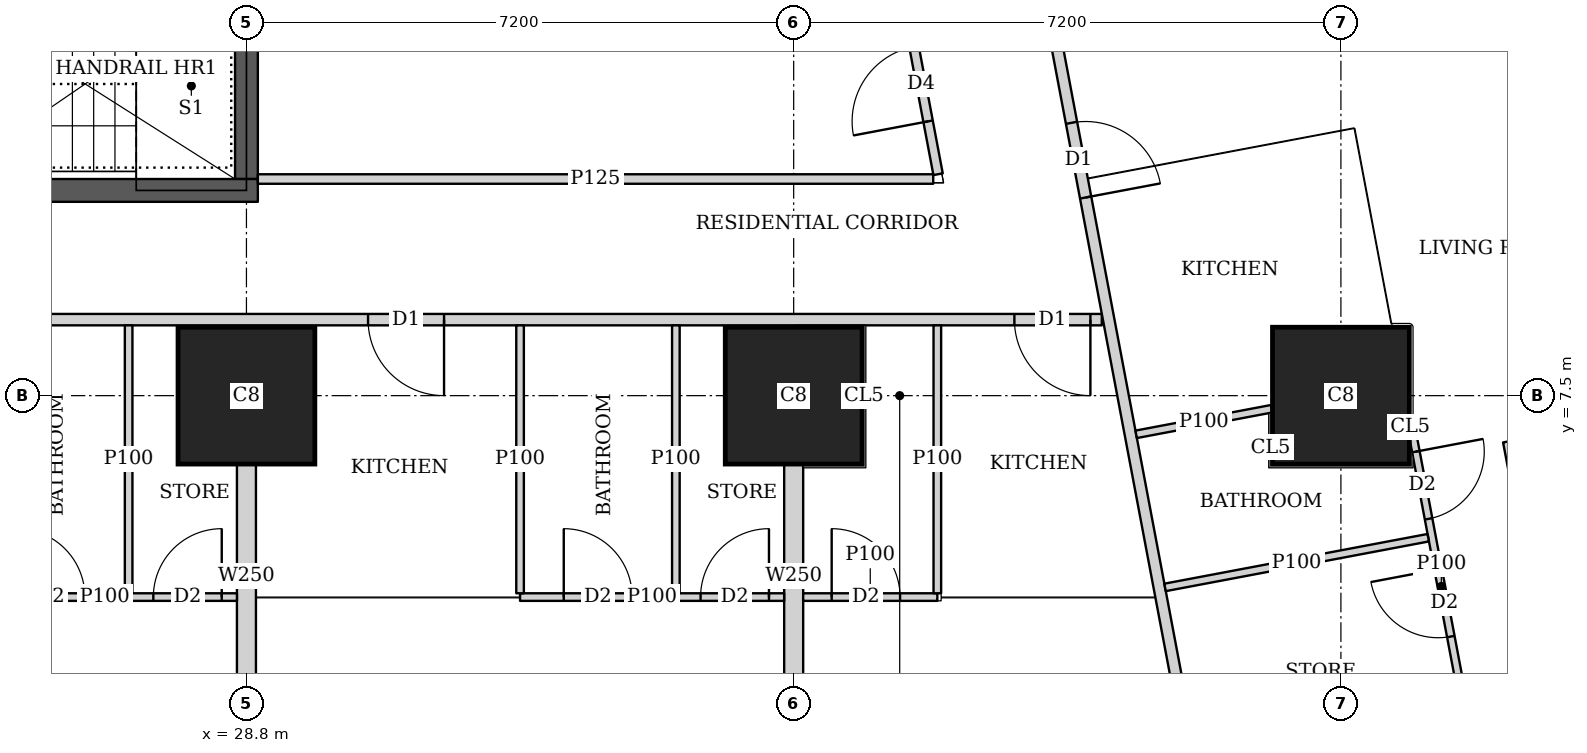
"""IFC4 building model, lengths in metres.
Left out: names, types, materials, properties, quantities, classifications, styles, units other than length and angle.
Written with IfcOpenShell. Run it as: python <this file> out.ifc"""

import sys

from ifc_helpers import new_model, si_unit, direction, frame, frame_2d, origin, origin_2d, place, context, subcontext, project, spatial, rectangle, extrude, element, fill, save


model = new_model("IFC4")
c1 = context("Model", 3, precision=1e-05, world=origin(), true_north=direction((0.0, 1.0)))
c2 = subcontext(c1, "Body", "Model", "MODEL_VIEW")
j1 = project(units=[si_unit("LENGTHUNIT", "METRE"), si_unit("PLANEANGLEUNIT", "RADIAN")], contexts=[c1])
p1 = place(None, origin())
s1 = spatial("IfcSite", under=j1, at=p1, CompositionType="ELEMENT")
p2 = place(p1, origin())
s2 = spatial("IfcBuilding", under=s1, at=p2, CompositionType="ELEMENT")
p3 = place(p2, frame((0.0, 0.0, 42.5)))
s3 = spatial("IfcBuildingStorey", under=s2, at=p3, CompositionType="ELEMENT", Elevation=42.5)
for number, where, z_axis, x_axis in (
    (1, (28.8, 7.5, 0.0), (0.0, 0.0, 1.0), (1.0, 0.0, 0.0)),
    (2, (36.0, 7.5, 0.0), (0.0, 0.0, 1.0), (1.0, 0.0, 0.0)),
    (3, (43.2, 7.5, 0.0), (0.0, 0.0, 1.0), (1.0, 0.0, 0.0)),
):
    element("IfcColumn", number, at=place(p3, frame(where, z_axis=z_axis, x_axis=x_axis)), inside=s3, PredefinedType="COLUMN", context=c2, shape_type="SweptSolid", body=[
        extrude(rectangle(XDim=1.8, YDim=1.8, at=origin_2d()), origin(), (0.0, 0.0, 1.0), 3.75),
    ])
p4 = place(p3, frame((21.45, 10.2, 0.0), z_axis=(0.0, 0.0, 1.0), x_axis=(1.0, 0.0, 0.0)))
e4 = element("IfcWall", 4, at=p4, inside=s3, PredefinedType="SHEAR", context=c2, shape_type="SweptSolid", body=[
    extrude(rectangle(XDim=7.5, YDim=0.3, at=frame_2d((3.75, 0.0))), origin(), (0.0, 0.0, 1.0), 3.75),
])
p5 = place(p4, frame((0.5, 0.0, 0.0)))
e5 = element("IfcOpeningElement", 5, at=p5, cuts=e4, PredefinedType="OPENING", context=c2, shape_type="SweptSolid", body=[
    extrude(rectangle(XDim=1.1, YDim=2.1, at=frame_2d((0.55, 1.05))), frame((0.0, 0.16, 0.0), z_axis=(0.0, -1.0, 0.0), x_axis=(1.0, 0.0, 0.0)), (0.0, 0.0, 1.0), 0.32),
])
p6 = place(p3, frame((28.8, 10.35, 0.0), z_axis=(0.0, 0.0, 1.0), x_axis=(0.0, 1.0, 0.0)))
e6 = element("IfcWall", 6, at=p6, inside=s3, PredefinedType="SHEAR", context=c2, shape_type="SweptSolid", body=[
    extrude(rectangle(XDim=4.2, YDim=0.3, at=frame_2d((2.1, 0.0))), origin(), (0.0, 0.0, 1.0), 3.75),
])
p7 = place(p3, frame((50.653, 2.703, 0.0), z_axis=(0.0, 0.0, 1.0), x_axis=(-0.185612026696, 0.982623109613, 0.0)))
e7 = element("IfcWall", 7, at=p7, inside=s3, PredefinedType="SOLIDWALL", context=c2, shape_type="SweptSolid", body=[
    extrude(rectangle(XDim=41.393, YDim=0.2, at=frame_2d((20.697, 0.0))), origin(), (0.0, 0.0, 1.0), 3.5),
])
p8 = place(p7, frame((1.633, 0.0, 0.9)))
e8 = element("IfcOpeningElement", 8, at=p8, cuts=e7, PredefinedType="OPENING", context=c2, shape_type="SweptSolid", body=[
    extrude(rectangle(XDim=1.8, YDim=1.5, at=frame_2d((0.9, 0.75))), frame((0.0, 0.11, 0.0), z_axis=(0.0, -1.0, 0.0), x_axis=(1.0, 0.0, 0.0)), (0.0, 0.0, 1.0), 0.22),
])
p9 = place(p7, frame((6.032, 0.0, 0.9)))
e9 = element("IfcOpeningElement", 9, at=p9, cuts=e7, PredefinedType="OPENING", context=c2, shape_type="SweptSolid", body=[
    extrude(rectangle(XDim=1.8, YDim=1.5, at=frame_2d((0.9, 0.75))), frame((0.0, 0.11, 0.0), z_axis=(0.0, -1.0, 0.0), x_axis=(1.0, 0.0, 0.0)), (0.0, 0.0, 1.0), 0.22),
])
p10 = place(p7, frame((9.848, 0.0, 0.9)))
e10 = element("IfcOpeningElement", 10, at=p10, cuts=e7, PredefinedType="OPENING", context=c2, shape_type="SweptSolid", body=[
    extrude(rectangle(XDim=1.8, YDim=1.5, at=frame_2d((0.9, 0.75))), frame((0.0, 0.11, 0.0), z_axis=(0.0, -1.0, 0.0), x_axis=(1.0, 0.0, 0.0)), (0.0, 0.0, 1.0), 0.22),
])
p11 = place(p7, frame((17.481, 0.0, 0.9)))
e11 = element("IfcOpeningElement", 11, at=p11, cuts=e7, PredefinedType="OPENING", context=c2, shape_type="SweptSolid", body=[
    extrude(rectangle(XDim=1.8, YDim=1.5, at=frame_2d((0.9, 0.75))), frame((0.0, 0.11, 0.0), z_axis=(0.0, -1.0, 0.0), x_axis=(1.0, 0.0, 0.0)), (0.0, 0.0, 1.0), 0.22),
])
p12 = place(p7, frame((21.297, 0.0, 0.9)))
e12 = element("IfcOpeningElement", 12, at=p12, cuts=e7, PredefinedType="OPENING", context=c2, shape_type="SweptSolid", body=[
    extrude(rectangle(XDim=1.8, YDim=1.5, at=frame_2d((0.9, 0.75))), frame((0.0, 0.11, 0.0), z_axis=(0.0, -1.0, 0.0), x_axis=(1.0, 0.0, 0.0)), (0.0, 0.0, 1.0), 0.22),
])
p13 = place(p7, frame((25.113, 0.0, 0.9)))
e13 = element("IfcOpeningElement", 13, at=p13, cuts=e7, PredefinedType="OPENING", context=c2, shape_type="SweptSolid", body=[
    extrude(rectangle(XDim=1.8, YDim=1.5, at=frame_2d((0.9, 0.75))), frame((0.0, 0.11, 0.0), z_axis=(0.0, -1.0, 0.0), x_axis=(1.0, 0.0, 0.0)), (0.0, 0.0, 1.0), 0.22),
])
p14 = place(p7, frame((28.93, 0.0, 0.9)))
e14 = element("IfcOpeningElement", 14, at=p14, cuts=e7, PredefinedType="OPENING", context=c2, shape_type="SweptSolid", body=[
    extrude(rectangle(XDim=1.8, YDim=1.5, at=frame_2d((0.9, 0.75))), frame((0.0, 0.11, 0.0), z_axis=(0.0, -1.0, 0.0), x_axis=(1.0, 0.0, 0.0)), (0.0, 0.0, 1.0), 0.22),
])
p15 = place(p7, frame((32.746, 0.0, 0.9)))
e15 = element("IfcOpeningElement", 15, at=p15, cuts=e7, PredefinedType="OPENING", context=c2, shape_type="SweptSolid", body=[
    extrude(rectangle(XDim=1.8, YDim=1.5, at=frame_2d((0.9, 0.75))), frame((0.0, 0.11, 0.0), z_axis=(0.0, -1.0, 0.0), x_axis=(1.0, 0.0, 0.0)), (0.0, 0.0, 1.0), 0.22),
])
p16 = place(p7, frame((36.481, 0.0, 0.9)))
e16 = element("IfcOpeningElement", 16, at=p16, cuts=e7, PredefinedType="OPENING", context=c2, shape_type="SweptSolid", body=[
    extrude(rectangle(XDim=1.8, YDim=1.5, at=frame_2d((0.9, 0.75))), frame((0.0, 0.11, 0.0), z_axis=(0.0, -1.0, 0.0), x_axis=(1.0, 0.0, 0.0)), (0.0, 0.0, 1.0), 0.22),
])
p17 = place(p3, frame((40.054, 8.5, 0.0), z_axis=(0.0, 0.0, 1.0), x_axis=(-1.0, 0.0, 0.0)))
e17 = element("IfcWall", 17, at=p17, inside=s3, PredefinedType="SOLIDWALL", context=c2, shape_type="SweptSolid", body=[
    extrude(rectangle(XDim=31.704, YDim=0.15, at=frame_2d((15.852, 0.0))), origin(), (0.0, 0.0, 1.0), 3.5),
])
p18 = place(p17, frame((27.321, 0.0, 0.0)))
e18 = element("IfcOpeningElement", 18, at=p18, cuts=e17, PredefinedType="OPENING", context=c2, shape_type="SweptSolid", body=[
    extrude(rectangle(XDim=1.0, YDim=2.1, at=frame_2d((0.5, 1.05))), frame((0.0, 0.085, 0.0), z_axis=(0.0, -1.0, 0.0), x_axis=(1.0, 0.0, 0.0)), (0.0, 0.0, 1.0), 0.17),
])
p19 = place(p17, frame((23.054, 0.0, 0.0)))
e19 = element("IfcOpeningElement", 19, at=p19, cuts=e17, PredefinedType="OPENING", context=c2, shape_type="SweptSolid", body=[
    extrude(rectangle(XDim=1.0, YDim=2.1, at=frame_2d((0.5, 1.05))), frame((0.0, 0.085, 0.0), z_axis=(0.0, -1.0, 0.0), x_axis=(1.0, 0.0, 0.0)), (0.0, 0.0, 1.0), 0.17),
])
p20 = place(p17, frame((15.854, 0.0, 0.0)))
e20 = element("IfcOpeningElement", 20, at=p20, cuts=e17, PredefinedType="OPENING", context=c2, shape_type="SweptSolid", body=[
    extrude(rectangle(XDim=1.0, YDim=2.1, at=frame_2d((0.5, 1.05))), frame((0.0, 0.085, 0.0), z_axis=(0.0, -1.0, 0.0), x_axis=(1.0, 0.0, 0.0)), (0.0, 0.0, 1.0), 0.17),
])
p21 = place(p17, frame((8.654, 0.0, 0.0)))
e21 = element("IfcOpeningElement", 21, at=p21, cuts=e17, PredefinedType="OPENING", context=c2, shape_type="SweptSolid", body=[
    extrude(rectangle(XDim=1.0, YDim=2.1, at=frame_2d((0.5, 1.05))), frame((0.0, 0.085, 0.0), z_axis=(0.0, -1.0, 0.0), x_axis=(1.0, 0.0, 0.0)), (0.0, 0.0, 1.0), 0.17),
])
p22 = place(p17, frame((0.15, 0.0, 0.0)))
e22 = element("IfcOpeningElement", 22, at=p22, cuts=e17, PredefinedType="OPENING", context=c2, shape_type="SweptSolid", body=[
    extrude(rectangle(XDim=1.0, YDim=2.1, at=frame_2d((0.5, 1.05))), frame((0.0, 0.085, 0.0), z_axis=(0.0, -1.0, 0.0), x_axis=(1.0, 0.0, 0.0)), (0.0, 0.0, 1.0), 0.17),
])
p23 = place(p3, frame((33.68, 42.723, 0.0), z_axis=(0.0, 0.0, 1.0), x_axis=(0.185624129307, -0.98262082342, 0.0)))
e23 = element("IfcWall", 23, at=p23, inside=s3, PredefinedType="SOLIDWALL", context=c2, shape_type="SweptSolid", body=[
    extrude(rectangle(XDim=41.051, YDim=0.15, at=frame_2d((20.526, 0.0))), origin(), (0.0, 0.0, 1.0), 2.5),
])
p24 = place(p23, frame((7.73, 0.0, 0.0)))
e24 = element("IfcOpeningElement", 24, at=p24, cuts=e23, PredefinedType="OPENING", context=c2, shape_type="SweptSolid", body=[
    extrude(rectangle(XDim=1.0, YDim=2.1, at=frame_2d((0.5, 1.05))), frame((0.0, 0.085, 0.0), z_axis=(0.0, -1.0, 0.0), x_axis=(1.0, 0.0, 0.0)), (0.0, 0.0, 1.0), 0.17),
])
p25 = place(p23, frame((12.307, 0.0, 0.0)))
e25 = element("IfcOpeningElement", 25, at=p25, cuts=e23, PredefinedType="OPENING", context=c2, shape_type="SweptSolid", body=[
    extrude(rectangle(XDim=1.0, YDim=2.1, at=frame_2d((0.5, 1.05))), frame((0.0, 0.085, 0.0), z_axis=(0.0, -1.0, 0.0), x_axis=(1.0, 0.0, 0.0)), (0.0, 0.0, 1.0), 0.17),
])
p26 = place(p23, frame((19.938, 0.0, 0.0)))
e26 = element("IfcOpeningElement", 26, at=p26, cuts=e23, PredefinedType="OPENING", context=c2, shape_type="SweptSolid", body=[
    extrude(rectangle(XDim=1.0, YDim=2.1, at=frame_2d((0.5, 1.05))), frame((0.0, 0.085, 0.0), z_axis=(0.0, -1.0, 0.0), x_axis=(1.0, 0.0, 0.0)), (0.0, 0.0, 1.0), 0.17),
])
p27 = place(p23, frame((32.193, 0.0, 0.0)))
e27 = element("IfcOpeningElement", 27, at=p27, cuts=e23, PredefinedType="OPENING", context=c2, shape_type="SweptSolid", body=[
    extrude(rectangle(XDim=1.0, YDim=2.1, at=frame_2d((0.5, 1.05))), frame((0.0, 0.085, 0.0), z_axis=(0.0, -1.0, 0.0), x_axis=(1.0, 0.0, 0.0)), (0.0, 0.0, 1.0), 0.17),
])
p28 = place(p3, frame((28.675, 4.85, 0.0), z_axis=(0.0, 0.0, 1.0), x_axis=(-1.0, 0.0, 0.0)))
e28 = element("IfcWall", 28, at=p28, inside=s3, PredefinedType="PARTITIONING", context=c2, shape_type="SweptSolid", body=[
    extrude(rectangle(XDim=3.475, YDim=0.1, at=frame_2d((1.738, 0.0))), origin(), (0.0, 0.0, 1.0), 3.5),
])
p29 = place(p28, frame((2.0, 0.0, 0.0)))
e29 = element("IfcOpeningElement", 29, at=p29, cuts=e28, PredefinedType="OPENING", context=c2, shape_type="SweptSolid", body=[
    extrude(rectangle(XDim=0.9, YDim=2.1, at=frame_2d((0.45, 1.05))), frame((0.0, 0.06, 0.0), z_axis=(0.0, -1.0, 0.0), x_axis=(1.0, 0.0, 0.0)), (0.0, 0.0, 1.0), 0.12),
])
p30 = place(p28, frame((0.2, 0.0, 0.0)))
e30 = element("IfcOpeningElement", 30, at=p30, cuts=e28, PredefinedType="OPENING", context=c2, shape_type="SweptSolid", body=[
    extrude(rectangle(XDim=0.9, YDim=2.1, at=frame_2d((0.45, 1.05))), frame((0.0, 0.06, 0.0), z_axis=(0.0, -1.0, 0.0), x_axis=(1.0, 0.0, 0.0)), (0.0, 0.0, 1.0), 0.12),
])
p31 = place(p3, frame((27.25, 4.9, 0.0), z_axis=(0.0, 0.0, 1.0), x_axis=(0.0, 1.0, 0.0)))
e31 = element("IfcWall", 31, at=p31, inside=s3, PredefinedType="PARTITIONING", context=c2, shape_type="SweptSolid", body=[
    extrude(rectangle(XDim=3.525, YDim=0.1, at=frame_2d((1.763, 0.0))), origin(), (0.0, 0.0, 1.0), 3.5),
])
p32 = place(p3, frame((35.875, 4.85, 0.0), z_axis=(0.0, 0.0, 1.0), x_axis=(-1.0, 0.0, 0.0)))
e32 = element("IfcWall", 32, at=p32, inside=s3, PredefinedType="PARTITIONING", context=c2, shape_type="SweptSolid", body=[
    extrude(rectangle(XDim=3.475, YDim=0.1, at=frame_2d((1.738, 0.0))), origin(), (0.0, 0.0, 1.0), 3.5),
])
p33 = place(p32, frame((2.0, 0.0, 0.0)))
e33 = element("IfcOpeningElement", 33, at=p33, cuts=e32, PredefinedType="OPENING", context=c2, shape_type="SweptSolid", body=[
    extrude(rectangle(XDim=0.9, YDim=2.1, at=frame_2d((0.45, 1.05))), frame((0.0, 0.06, 0.0), z_axis=(0.0, -1.0, 0.0), x_axis=(1.0, 0.0, 0.0)), (0.0, 0.0, 1.0), 0.12),
])
p34 = place(p32, frame((0.2, 0.0, 0.0)))
e34 = element("IfcOpeningElement", 34, at=p34, cuts=e32, PredefinedType="OPENING", context=c2, shape_type="SweptSolid", body=[
    extrude(rectangle(XDim=0.9, YDim=2.1, at=frame_2d((0.45, 1.05))), frame((0.0, 0.06, 0.0), z_axis=(0.0, -1.0, 0.0), x_axis=(1.0, 0.0, 0.0)), (0.0, 0.0, 1.0), 0.12),
])
for number, where, z_axis, x_axis in (
    (35, (32.4, 4.9, 0.0), (0.0, 0.0, 1.0), (0.0, 1.0, 0.0)),
    (36, (34.45, 4.9, 0.0), (0.0, 0.0, 1.0), (0.0, 1.0, 0.0)),
):
    element("IfcWall", number, at=place(p3, frame(where, z_axis=z_axis, x_axis=x_axis)), inside=s3, PredefinedType="PARTITIONING", context=c2, shape_type="SweptSolid", body=[
        extrude(rectangle(XDim=3.525, YDim=0.1, at=frame_2d((1.763, 0.0))), origin(), (0.0, 0.0, 1.0), 3.5),
    ])
p35 = place(p3, frame((28.8, 3.65, 0.0), z_axis=(0.0, 0.0, 1.0), x_axis=(0.0, 1.0, 0.0)))
e37 = element("IfcWall", 37, at=p35, inside=s3, PredefinedType="SOLIDWALL", context=c2, shape_type="SweptSolid", body=[
    extrude(rectangle(XDim=2.949, YDim=0.25, at=frame_2d((1.475, 0.0))), origin(), (0.0, 0.0, 1.0), 3.5),
])
p36 = place(p3, frame((37.89, 4.85, 0.0), z_axis=(0.0, 0.0, 1.0), x_axis=(-1.0, 0.0, 0.0)))
e38 = element("IfcWall", 38, at=p36, inside=s3, PredefinedType="PARTITIONING", context=c2, shape_type="SweptSolid", body=[
    extrude(rectangle(XDim=1.765, YDim=0.1, at=frame_2d((0.882, 0.0))), origin(), (0.0, 0.0, 1.0), 3.5),
])
p37 = place(p36, frame((0.49, 0.0, 0.0)))
e39 = element("IfcOpeningElement", 39, at=p37, cuts=e38, PredefinedType="OPENING", context=c2, shape_type="SweptSolid", body=[
    extrude(rectangle(XDim=0.9, YDim=2.1, at=frame_2d((0.45, 1.05))), frame((0.0, 0.06, 0.0), z_axis=(0.0, -1.0, 0.0), x_axis=(1.0, 0.0, 0.0)), (0.0, 0.0, 1.0), 0.12),
])
p38 = place(p3, frame((37.89, 4.9, 0.0), z_axis=(0.0, 0.0, 1.0), x_axis=(0.0, 1.0, 0.0)))
e40 = element("IfcWall", 40, at=p38, inside=s3, PredefinedType="PARTITIONING", context=c2, shape_type="SweptSolid", body=[
    extrude(rectangle(XDim=3.525, YDim=0.1, at=frame_2d((1.763, 0.0))), origin(), (0.0, 0.0, 1.0), 3.5),
])
p39 = place(p3, frame((36.0, 3.65, 0.0), z_axis=(0.0, 0.0, 1.0), x_axis=(0.0, 1.0, 0.0)))
e41 = element("IfcWall", 41, at=p39, inside=s3, PredefinedType="SOLIDWALL", context=c2, shape_type="SweptSolid", body=[
    extrude(rectangle(XDim=2.949, YDim=0.25, at=frame_2d((1.475, 0.0))), origin(), (0.0, 0.0, 1.0), 3.5),
])
p40 = place(p3, frame((45.383, 6.894, 0.0), z_axis=(0.0, 0.0, 1.0), x_axis=(0.185791461635, -0.982589198385, 0.0)))
e42 = element("IfcWall", 42, at=p40, inside=s3, PredefinedType="PARTITIONING", context=c2, shape_type="SweptSolid", body=[
    extrude(rectangle(XDim=3.687, YDim=0.1, at=frame_2d((1.844, 0.0))), origin(), (0.0, 0.0, 1.0), 3.5),
])
p41 = place(p40, frame((1.3, 0.0, 0.0)))
e43 = element("IfcOpeningElement", 43, at=p41, cuts=e42, PredefinedType="OPENING", context=c2, shape_type="SweptSolid", body=[
    extrude(rectangle(XDim=0.9, YDim=2.1, at=frame_2d((0.45, 1.05))), frame((0.0, 0.06, 0.0), z_axis=(0.0, -1.0, 0.0), x_axis=(1.0, 0.0, 0.0)), (0.0, 0.0, 1.0), 0.12),
])
p42 = place(p3, frame((44.149, 6.96, 0.0), z_axis=(0.0, 0.0, 1.0), x_axis=(0.185824941804, -0.982582867245, 0.0)))
e44 = element("IfcWall", 44, at=p42, inside=s3, PredefinedType="PARTITIONING", context=c2, shape_type="SweptSolid", body=[
    extrude(rectangle(XDim=4.01, YDim=0.1, at=frame_2d((2.005, 0.0))), origin(), (0.0, 0.0, 1.0), 3.5),
])
p43 = place(p42, frame((0.2, 0.0, 0.0)))
e45 = element("IfcOpeningElement", 45, at=p43, cuts=e44, PredefinedType="OPENING", context=c2, shape_type="SweptSolid", body=[
    extrude(rectangle(XDim=0.9, YDim=2.1, at=frame_2d((0.45, 1.05))), frame((0.0, 0.06, 0.0), z_axis=(0.0, -1.0, 0.0), x_axis=(1.0, 0.0, 0.0)), (0.0, 0.0, 1.0), 0.12),
])
p44 = place(p42, frame((1.776, 0.0, 0.0)))
e46 = element("IfcOpeningElement", 46, at=p44, cuts=e44, PredefinedType="OPENING", context=c2, shape_type="SweptSolid", body=[
    extrude(rectangle(XDim=0.9, YDim=2.1, at=frame_2d((0.45, 1.05))), frame((0.0, 0.06, 0.0), z_axis=(0.0, -1.0, 0.0), x_axis=(1.0, 0.0, 0.0)), (0.0, 0.0, 1.0), 0.12),
])
p45 = place(p3, frame((42.29, 7.328, 0.0), z_axis=(0.0, 0.0, 1.0), x_axis=(-0.98262927905, -0.185579362952, 0.0)))
e47 = element("IfcWall", 47, at=p45, inside=s3, PredefinedType="PARTITIONING", context=c2, shape_type="SweptSolid", body=[
    extrude(rectangle(XDim=1.815, YDim=0.1, at=frame_2d((0.908, 0.0))), origin(), (0.0, 0.0, 1.0), 3.5),
])
p46 = place(p3, frame((44.349, 5.631, 0.0), z_axis=(0.0, 0.0, 1.0), x_axis=(-0.982629014545, -0.18558076348, 0.0)))
e48 = element("IfcWall", 48, at=p46, inside=s3, PredefinedType="PARTITIONING", context=c2, shape_type="SweptSolid", body=[
    extrude(rectangle(XDim=3.524, YDim=0.1, at=frame_2d((1.762, 0.0))), origin(), (0.0, 0.0, 1.0), 3.5),
])
p47 = place(p3, frame((28.95, 10.35, 0.0), z_axis=(0.0, 0.0, 1.0), x_axis=(1.0, 0.0, 0.0)))
e49 = element("IfcWall", 49, at=p47, inside=s3, PredefinedType="PARTITIONING", context=c2, shape_type="SweptSolid", body=[
    extrude(rectangle(XDim=8.886, YDim=0.125, at=frame_2d((4.443, 0.0))), origin(), (0.0, 0.0, 1.0), 3.5),
])
p48 = place(p3, frame((37.9, 10.413, 0.0), z_axis=(0.0, 0.0, 1.0), x_axis=(-0.185527510388, 0.982639070508, 0.0)))
e50 = element("IfcWall", 50, at=p48, inside=s3, PredefinedType="PARTITIONING", context=c2, shape_type="SweptSolid", body=[
    extrude(rectangle(XDim=5.056, YDim=0.125, at=frame_2d((2.528, 0.0))), origin(), (0.0, 0.0, 1.0), 3.5),
])
p49 = place(p48, frame((0.708, 0.0, 0.0)))
e51 = element("IfcOpeningElement", 51, at=p49, cuts=e50, PredefinedType="OPENING", context=c2, shape_type="SweptSolid", body=[
    extrude(rectangle(XDim=1.0, YDim=2.1, at=frame_2d((0.5, 1.05))), frame((0.0, 0.073, 0.0), z_axis=(0.0, -1.0, 0.0), x_axis=(1.0, 0.0, 0.0)), (0.0, 0.0, 1.0), 0.145),
])
p50 = place(p29, origin())
e52 = element("IfcDoor", 52, at=p50, inside=s3, OperationType="SINGLE_SWING_LEFT", PredefinedType="DOOR", context=c2, shape_type="SweptSolid", body=[
    extrude(rectangle(XDim=0.9, YDim=2.1, at=frame_2d((0.45, 1.05))), frame((0.0, 0.025, 0.0), z_axis=(0.0, -1.0, 0.0), x_axis=(1.0, 0.0, 0.0)), (0.0, 0.0, 1.0), 0.05),
])
fill(e29, e52)
p51 = place(p30, origin())
e53 = element("IfcDoor", 53, at=p51, inside=s3, OperationType="SINGLE_SWING_RIGHT", PredefinedType="DOOR", context=c2, shape_type="SweptSolid", body=[
    extrude(rectangle(XDim=0.9, YDim=2.1, at=frame_2d((0.45, 1.05))), frame((0.0, 0.025, 0.0), z_axis=(0.0, -1.0, 0.0), x_axis=(1.0, 0.0, 0.0)), (0.0, 0.0, 1.0), 0.05),
])
fill(e30, e53)
p52 = place(p33, origin())
e54 = element("IfcDoor", 54, at=p52, inside=s3, OperationType="SINGLE_SWING_LEFT", PredefinedType="DOOR", context=c2, shape_type="SweptSolid", body=[
    extrude(rectangle(XDim=0.9, YDim=2.1, at=frame_2d((0.45, 1.05))), frame((0.0, 0.025, 0.0), z_axis=(0.0, -1.0, 0.0), x_axis=(1.0, 0.0, 0.0)), (0.0, 0.0, 1.0), 0.05),
])
fill(e33, e54)
p53 = place(p34, origin())
e55 = element("IfcDoor", 55, at=p53, inside=s3, OperationType="SINGLE_SWING_RIGHT", PredefinedType="DOOR", context=c2, shape_type="SweptSolid", body=[
    extrude(rectangle(XDim=0.9, YDim=2.1, at=frame_2d((0.45, 1.05))), frame((0.0, 0.025, 0.0), z_axis=(0.0, -1.0, 0.0), x_axis=(1.0, 0.0, 0.0)), (0.0, 0.0, 1.0), 0.05),
])
fill(e34, e55)
p54 = place(p21, origin())
e56 = element("IfcDoor", 56, at=p54, inside=s3, OperationType="SINGLE_SWING_LEFT", PredefinedType="DOOR", context=c2, shape_type="SweptSolid", body=[
    extrude(rectangle(XDim=1.0, YDim=2.1, at=frame_2d((0.5, 1.05))), frame((0.0, 0.025, 0.0), z_axis=(0.0, -1.0, 0.0), x_axis=(1.0, 0.0, 0.0)), (0.0, 0.0, 1.0), 0.05),
])
fill(e21, e56)
p55 = place(p37, origin())
e57 = element("IfcDoor", 57, at=p55, inside=s3, OperationType="SINGLE_SWING_LEFT", PredefinedType="DOOR", context=c2, shape_type="SweptSolid", body=[
    extrude(rectangle(XDim=0.9, YDim=2.1, at=frame_2d((0.45, 1.05))), frame((0.0, 0.025, 0.0), z_axis=(0.0, -1.0, 0.0), x_axis=(1.0, 0.0, 0.0)), (0.0, 0.0, 1.0), 0.05),
])
fill(e39, e57)
p56 = place(p22, origin())
e58 = element("IfcDoor", 58, at=p56, inside=s3, OperationType="SINGLE_SWING_LEFT", PredefinedType="DOOR", context=c2, shape_type="SweptSolid", body=[
    extrude(rectangle(XDim=1.0, YDim=2.1, at=frame_2d((0.5, 1.05))), frame((0.0, 0.025, 0.0), z_axis=(0.0, -1.0, 0.0), x_axis=(1.0, 0.0, 0.0)), (0.0, 0.0, 1.0), 0.05),
])
fill(e22, e58)
p57 = place(p43, origin())
e59 = element("IfcDoor", 59, at=p57, inside=s3, OperationType="SINGLE_SWING_LEFT", PredefinedType="DOOR", context=c2, shape_type="SweptSolid", body=[
    extrude(rectangle(XDim=0.9, YDim=2.1, at=frame_2d((0.45, 1.05))), frame((0.0, 0.025, 0.0), z_axis=(0.0, -1.0, 0.0), x_axis=(1.0, 0.0, 0.0)), (0.0, 0.0, 1.0), 0.05),
])
fill(e45, e59)
p58 = place(p44, origin())
e60 = element("IfcDoor", 60, at=p58, inside=s3, OperationType="SINGLE_SWING_RIGHT", PredefinedType="DOOR", context=c2, shape_type="SweptSolid", body=[
    extrude(rectangle(XDim=0.9, YDim=2.1, at=frame_2d((0.45, 1.05))), frame((0.0, 0.025, 0.0), z_axis=(0.0, -1.0, 0.0), x_axis=(1.0, 0.0, 0.0)), (0.0, 0.0, 1.0), 0.05),
])
fill(e46, e60)
p59 = place(p27, origin())
e61 = element("IfcDoor", 61, at=p59, inside=s3, OperationType="SINGLE_SWING_RIGHT", PredefinedType="DOOR", context=c2, shape_type="SweptSolid", body=[
    extrude(rectangle(XDim=1.0, YDim=2.1, at=frame_2d((0.5, 1.05))), frame((0.0, 0.025, 0.0), z_axis=(0.0, -1.0, 0.0), x_axis=(1.0, 0.0, 0.0)), (0.0, 0.0, 1.0), 0.05),
])
fill(e27, e61)
p60 = place(p49, origin())
e62 = element("IfcDoor", 62, at=p60, inside=s3, OperationType="SINGLE_SWING_LEFT", PredefinedType="DOOR", context=c2, shape_type="SweptSolid", body=[
    extrude(rectangle(XDim=1.0, YDim=2.1, at=frame_2d((0.5, 1.05))), frame((0.0, 0.025, 0.0), z_axis=(0.0, -1.0, 0.0), x_axis=(1.0, 0.0, 0.0)), (0.0, 0.0, 1.0), 0.05),
])
fill(e51, e62)
save(model, sys.argv[1])
